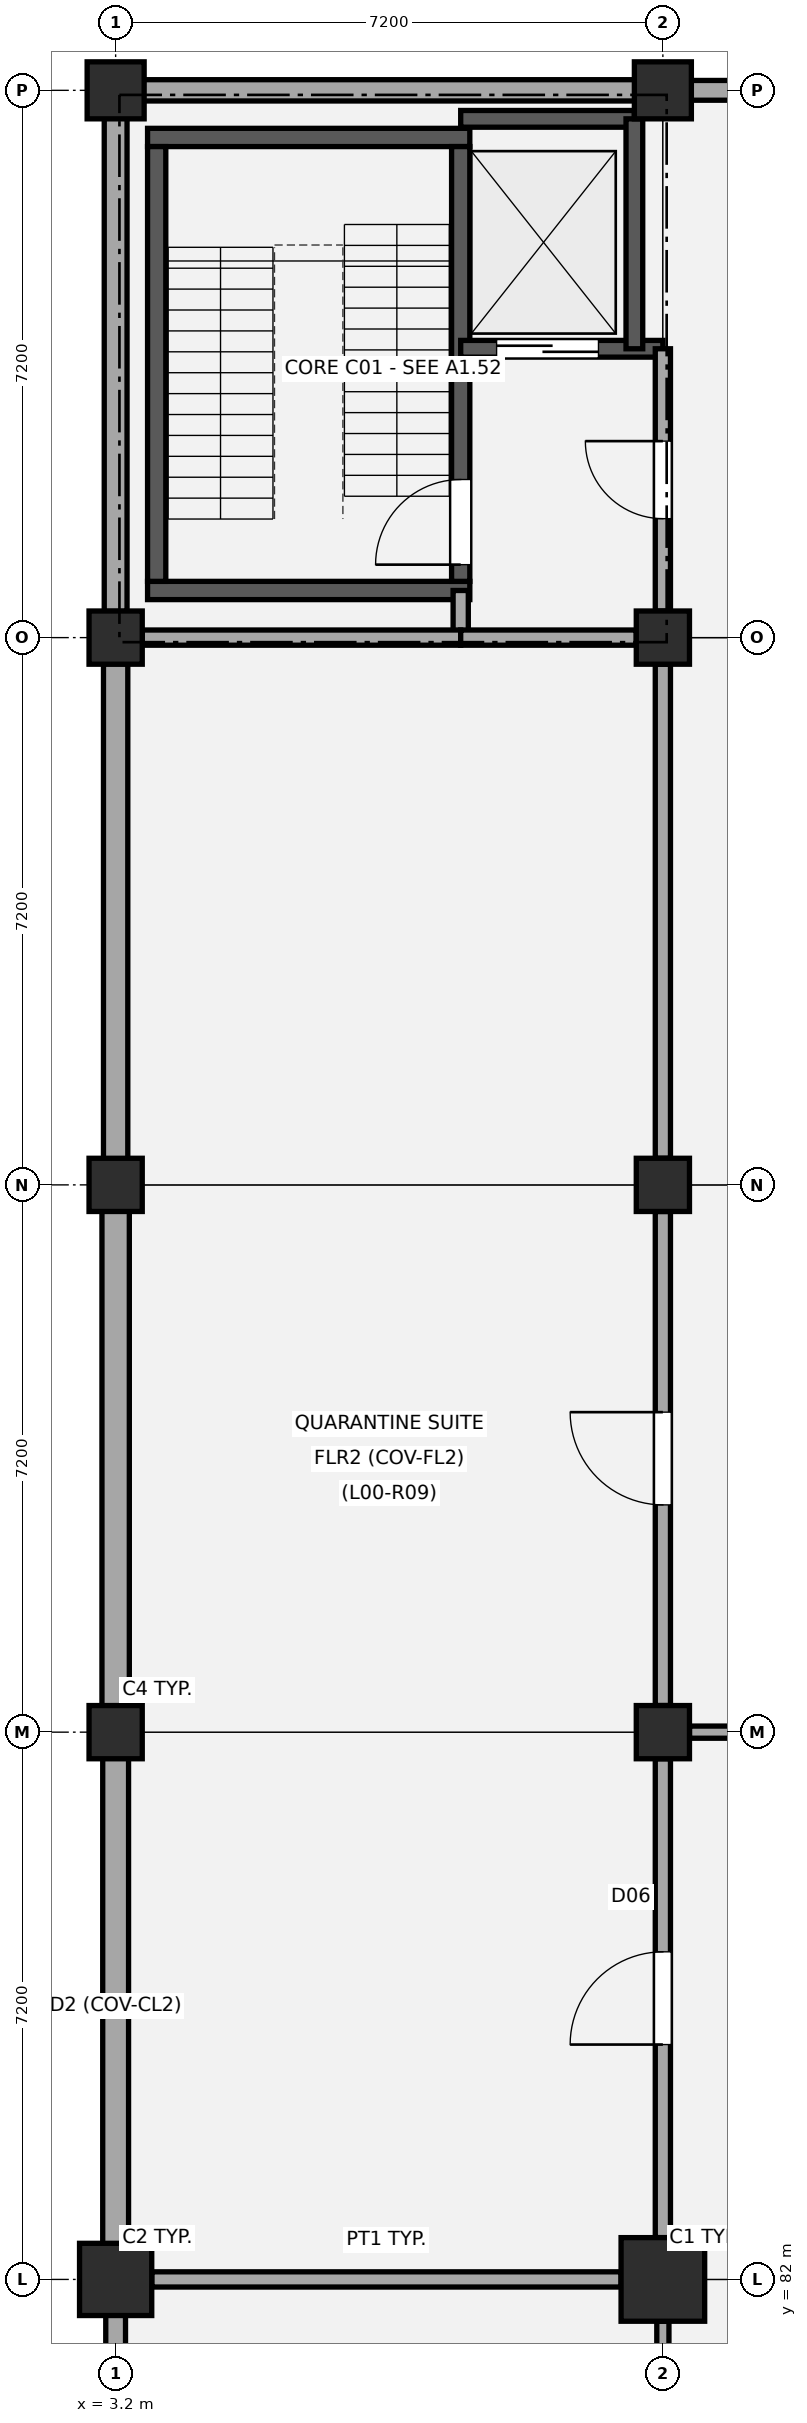
"""IFC4 building model, lengths in metres.
Left out: names, types, materials, properties, quantities, classifications, styles, units other than length and angle.
Written with IfcOpenShell. Run it as: python <this file> out.ifc"""

import sys

from ifc_helpers import new_model, si_unit, direction, frame, frame_2d, origin, origin_2d, place, context, subcontext, project, spatial, rectangle, circle, extrude, element, fill, save


model = new_model("IFC4")
c1 = context("Model", 3, precision=1e-05, world=origin(), true_north=direction((0.0, 1.0)))
c2 = subcontext(c1, "Body", "Model", "MODEL_VIEW")
j1 = project(units=[si_unit("LENGTHUNIT", "METRE"), si_unit("PLANEANGLEUNIT", "RADIAN")], contexts=[c1])
p1 = place(None, origin())
s1 = spatial("IfcSite", under=j1, at=p1, CompositionType="ELEMENT")
p2 = place(p1, origin())
s2 = spatial("IfcBuilding", under=s1, at=p2, CompositionType="ELEMENT")
p3 = place(p2, origin())
s3 = spatial("IfcBuildingStorey", under=s2, at=p3, CompositionType="ELEMENT", Elevation=0.0)
p4 = place(p3, frame((3.2, 82.0, -0.35), z_axis=(0.0, 0.0, 1.0), x_axis=(1.0, 0.0, 0.0)))
e1 = element("IfcColumn", 1, at=p4, inside=s3, PredefinedType="COLUMN", context=c2, shape_type="SweptSolid", body=[
    extrude(rectangle(XDim=0.95, YDim=0.95, at=origin_2d()), origin(), (0.0, 0.0, 1.0), 5.03),
])
for number, where, z_axis, x_axis in (
    (2, (3.2, 89.2, -0.35), (0.0, 0.0, 1.0), (1.0, 0.0, 0.0)),
    (3, (3.2, 96.4, -0.35), (0.0, 0.0, 1.0), (1.0, 0.0, 0.0)),
    (4, (3.2, 103.6, -0.35), (0.0, 0.0, 1.0), (1.0, 0.0, 0.0)),
):
    element("IfcColumn", number, at=place(p3, frame(where, z_axis=z_axis, x_axis=x_axis)), inside=s3, PredefinedType="COLUMN", context=c2, shape_type="SweptSolid", body=[
        extrude(rectangle(XDim=0.7, YDim=0.7, at=origin_2d()), origin(), (0.0, 0.0, 1.0), 5.03),
    ])
p5 = place(p3, frame((3.2, 110.8, -0.35), z_axis=(0.0, 0.0, 1.0), x_axis=(1.0, 0.0, 0.0)))
e5 = element("IfcColumn", 5, at=p5, inside=s3, PredefinedType="COLUMN", context=c2, shape_type="SweptSolid", body=[
    extrude(circle(Radius=0.375, at=origin_2d()), origin(), (0.0, 0.0, 1.0), 5.03),
])
p6 = place(p3, frame((10.4, 82.0, -0.35), z_axis=(0.0, 0.0, 1.0), x_axis=(1.0, 0.0, 0.0)))
e6 = element("IfcColumn", 6, at=p6, inside=s3, PredefinedType="COLUMN", context=c2, shape_type="SweptSolid", body=[
    extrude(rectangle(XDim=1.1, YDim=1.1, at=origin_2d()), origin(), (0.0, 0.0, 1.0), 5.03),
])
for number, where, z_axis, x_axis in (
    (7, (10.4, 89.2, -0.35), (0.0, 0.0, 1.0), (1.0, 0.0, 0.0)),
    (8, (10.4, 96.4, -0.35), (0.0, 0.0, 1.0), (1.0, 0.0, 0.0)),
    (9, (10.4, 103.6, -0.35), (0.0, 0.0, 1.0), (1.0, 0.0, 0.0)),
):
    element("IfcColumn", number, at=place(p3, frame(where, z_axis=z_axis, x_axis=x_axis)), inside=s3, PredefinedType="COLUMN", context=c2, shape_type="SweptSolid", body=[
        extrude(rectangle(XDim=0.7, YDim=0.7, at=origin_2d()), origin(), (0.0, 0.0, 1.0), 5.03),
    ])
p7 = place(p3, frame((10.4, 110.8, -0.35), z_axis=(0.0, 0.0, 1.0), x_axis=(1.0, 0.0, 0.0)))
e10 = element("IfcColumn", 10, at=p7, inside=s3, PredefinedType="COLUMN", context=c2, shape_type="SweptSolid", body=[
    extrude(circle(Radius=0.375, at=origin_2d()), origin(), (0.0, 0.0, 1.0), 5.03),
])
p8 = place(p3, frame((3.51, 110.8, 0.0), z_axis=(0.0, 0.0, 1.0), x_axis=(1.0, 0.0, 0.0)))
e11 = element("IfcWall", 11, at=p8, inside=s3, PredefinedType="STANDARD", context=c2, shape_type="SweptSolid", body=[
    extrude(rectangle(XDim=6.58, YDim=0.28, at=frame_2d((3.29, 0.0))), origin(), (0.0, 0.0, 1.0), 3.67),
])
p9 = place(p3, frame((10.71, 110.8, 0.0), z_axis=(0.0, 0.0, 1.0), x_axis=(1.0, 0.0, 0.0)))
e12 = element("IfcWall", 12, at=p9, inside=s3, PredefinedType="STANDARD", context=c2, shape_type="SweptSolid", body=[
    extrude(rectangle(XDim=6.58, YDim=0.26, at=frame_2d((3.29, 0.0))), origin(), (0.0, 0.0, 1.0), 3.67),
])
p10 = place(p3, frame((3.2, 75.345, 0.0), z_axis=(0.0, 0.0, 1.0), x_axis=(0.0, 1.0, 0.0)))
e13 = element("IfcWall", 13, at=p10, inside=s3, PredefinedType="STANDARD", context=c2, shape_type="SweptSolid", body=[
    extrude(rectangle(XDim=6.185, YDim=0.26, at=frame_2d((3.093, 0.0))), origin(), (0.0, 0.0, 1.0), 2.47),
])
p11 = place(p3, frame((3.2, 82.47, 0.0), z_axis=(0.0, 0.0, 1.0), x_axis=(0.0, 1.0, 0.0)))
e14 = element("IfcWall", 14, at=p11, inside=s3, PredefinedType="STANDARD", context=c2, shape_type="SweptSolid", body=[
    extrude(rectangle(XDim=6.385, YDim=0.34, at=frame_2d((3.192, 0.0))), origin(), (0.0, 0.0, 1.0), 3.67),
])
p12 = place(p3, frame((3.2, 89.545, 0.0), z_axis=(0.0, 0.0, 1.0), x_axis=(0.0, 1.0, 0.0)))
e15 = element("IfcWall", 15, at=p12, inside=s3, PredefinedType="STANDARD", context=c2, shape_type="SweptSolid", body=[
    extrude(rectangle(XDim=6.51, YDim=0.36, at=frame_2d((3.255, 0.0))), origin(), (0.0, 0.0, 1.0), 3.67),
])
p13 = place(p3, frame((3.2, 96.745, 0.0), z_axis=(0.0, 0.0, 1.0), x_axis=(0.0, 1.0, 0.0)))
e16 = element("IfcWall", 16, at=p13, inside=s3, PredefinedType="STANDARD", context=c2, shape_type="SweptSolid", body=[
    extrude(rectangle(XDim=6.51, YDim=0.32, at=frame_2d((3.255, 0.0))), origin(), (0.0, 0.0, 1.0), 3.67),
])
p14 = place(p3, frame((3.2, 103.945, 0.0), z_axis=(0.0, 0.0, 1.0), x_axis=(0.0, 1.0, 0.0)))
e17 = element("IfcWall", 17, at=p14, inside=s3, PredefinedType="STANDARD", context=c2, shape_type="SweptSolid", body=[
    extrude(rectangle(XDim=6.545, YDim=0.3, at=frame_2d((3.272, 0.0))), origin(), (0.0, 0.0, 1.0), 3.67),
])
for number, where, z_axis, x_axis in (
    (18, (3.62, 104.22, 0.0), (0.0, 0.0, 1.0), (1.0, 0.0, 0.0)),
    (19, (3.62, 110.18, 0.0), (0.0, 0.0, 1.0), (1.0, 0.0, 0.0)),
):
    element("IfcWall", number, at=place(p3, frame(where, z_axis=z_axis, x_axis=x_axis)), inside=s3, PredefinedType="SHEAR", context=c2, shape_type="SweptSolid", body=[
        extrude(rectangle(XDim=4.24, YDim=0.24, at=frame_2d((2.12, 0.0))), origin(), (0.0, 0.0, 1.0), 4.38),
    ])
p15 = place(p3, frame((3.74, 104.34, 0.0), z_axis=(0.0, 0.0, 1.0), x_axis=(0.0, 1.0, 0.0)))
e20 = element("IfcWall", 20, at=p15, inside=s3, PredefinedType="SHEAR", context=c2, shape_type="SweptSolid", body=[
    extrude(rectangle(XDim=5.72, YDim=0.24, at=frame_2d((2.86, 0.0))), origin(), (0.0, 0.0, 1.0), 4.38),
])
p16 = place(p3, frame((7.74, 104.34, 0.0), z_axis=(0.0, 0.0, 1.0), x_axis=(0.0, 1.0, 0.0)))
e21 = element("IfcWall", 21, at=p16, inside=s3, PredefinedType="SHEAR", context=c2, shape_type="SweptSolid", body=[
    extrude(rectangle(XDim=5.72, YDim=0.24, at=frame_2d((2.86, 0.0))), origin(), (0.0, 0.0, 1.0), 4.38),
])
p17 = place(p16, frame((0.22, 0.0, 0.0)))
e22 = element("IfcOpeningElement", 22, at=p17, cuts=e21, PredefinedType="OPENING", context=c2, shape_type="SweptSolid", body=[
    extrude(rectangle(XDim=1.12, YDim=2.15, at=frame_2d((0.56, 1.075))), frame((0.0, 0.13, 0.0), z_axis=(0.0, -1.0, 0.0), x_axis=(1.0, 0.0, 0.0)), (0.0, 0.0, 1.0), 0.26),
])
p18 = place(p3, frame((7.74, 107.4, 0.0), z_axis=(0.0, 0.0, 1.0), x_axis=(1.0, 0.0, 0.0)))
e23 = element("IfcWall", 23, at=p18, inside=s3, PredefinedType="SHEAR", context=c2, shape_type="SweptSolid", body=[
    extrude(rectangle(XDim=2.66, YDim=0.22, at=frame_2d((1.33, 0.0))), origin(), (0.0, 0.0, 1.0), 4.38),
])
p19 = place(p18, frame((0.472, 0.0, 0.0)))
e24 = element("IfcOpeningElement", 24, at=p19, cuts=e23, PredefinedType="OPENING", context=c2, shape_type="SweptSolid", body=[
    extrude(rectangle(XDim=1.34, YDim=2.15, at=frame_2d((0.67, 1.075))), frame((0.0, 0.12, 0.0), z_axis=(0.0, -1.0, 0.0), x_axis=(1.0, 0.0, 0.0)), (0.0, 0.0, 1.0), 0.24),
])
p20 = place(p3, frame((7.74, 110.425, 0.0), z_axis=(0.0, 0.0, 1.0), x_axis=(1.0, 0.0, 0.0)))
e25 = element("IfcWall", 25, at=p20, inside=s3, PredefinedType="SHEAR", context=c2, shape_type="SweptSolid", body=[
    extrude(rectangle(XDim=2.285, YDim=0.22, at=frame_2d((1.143, 0.0))), origin(), (0.0, 0.0, 1.0), 4.38),
])
p21 = place(p3, frame((10.025, 107.4, 0.0), z_axis=(0.0, 0.0, 1.0), x_axis=(0.0, 1.0, 0.0)))
e26 = element("IfcWall", 26, at=p21, inside=s3, PredefinedType="SHEAR", context=c2, shape_type="SweptSolid", body=[
    extrude(rectangle(XDim=3.025, YDim=0.22, at=frame_2d((1.513, 0.0))), origin(), (0.0, 0.0, 1.0), 4.38),
])
p22 = place(p3, frame((7.74, 103.6, 0.0), z_axis=(0.0, 0.0, 1.0), x_axis=(0.0, 1.0, 0.0)))
e27 = element("IfcWall", 27, at=p22, inside=s3, PredefinedType="PARTITIONING", context=c2, shape_type="SweptSolid", body=[
    extrude(rectangle(XDim=0.62, YDim=0.2, at=frame_2d((0.31, 0.0))), origin(), (0.0, 0.0, 1.0), 3.52),
])
p23 = place(p3, frame((10.4, 103.95, 0.0), z_axis=(0.0, 0.0, 1.0), x_axis=(0.0, 1.0, 0.0)))
e28 = element("IfcWall", 28, at=p23, inside=s3, PredefinedType="PARTITIONING", context=c2, shape_type="SweptSolid", body=[
    extrude(rectangle(XDim=3.45, YDim=0.2, at=frame_2d((1.725, 0.0))), origin(), (0.0, 0.0, 1.0), 3.62),
])
p24 = place(p23, frame((1.215, 0.0, 0.0)))
e29 = element("IfcOpeningElement", 29, at=p24, cuts=e28, PredefinedType="OPENING", context=c2, shape_type="SweptSolid", body=[
    extrude(rectangle(XDim=1.02, YDim=2.15, at=frame_2d((0.51, 1.075))), frame((0.0, 0.11, 0.0), z_axis=(0.0, -1.0, 0.0), x_axis=(1.0, 0.0, 0.0)), (0.0, 0.0, 1.0), 0.22),
])
p25 = place(p3, frame((3.55, 103.6, 0.0), z_axis=(0.0, 0.0, 1.0), x_axis=(1.0, 0.0, 0.0)))
e30 = element("IfcWall", 30, at=p25, inside=s3, PredefinedType="PARTITIONING", context=c2, shape_type="SweptSolid", body=[
    extrude(rectangle(XDim=4.19, YDim=0.2, at=frame_2d((2.095, 0.0))), origin(), (0.0, 0.0, 1.0), 3.52),
])
p26 = place(p3, frame((7.74, 103.6, 0.0), z_axis=(0.0, 0.0, 1.0), x_axis=(1.0, 0.0, 0.0)))
e31 = element("IfcWall", 31, at=p26, inside=s3, PredefinedType="PARTITIONING", context=c2, shape_type="SweptSolid", body=[
    extrude(rectangle(XDim=2.31, YDim=0.2, at=frame_2d((1.155, 0.0))), origin(), (0.0, 0.0, 1.0), 3.52),
])
p27 = place(p3, frame((10.4, 75.275, 0.0), z_axis=(0.0, 0.0, 1.0), x_axis=(0.0, 1.0, 0.0)))
e32 = element("IfcWall", 32, at=p27, inside=s3, PredefinedType="PARTITIONING", context=c2, shape_type="SweptSolid", body=[
    extrude(rectangle(XDim=6.175, YDim=0.16, at=frame_2d((3.087, 0.0))), origin(), (0.0, 0.0, 1.0), 2.47),
])
p28 = place(p27, frame((2.508, 0.0, 0.0)))
e33 = element("IfcOpeningElement", 33, at=p28, cuts=e32, PredefinedType="OPENING", context=c2, shape_type="SweptSolid", body=[
    extrude(rectangle(XDim=1.16, YDim=2.18, at=frame_2d((0.58, 1.09))), frame((0.0, 0.09, 0.0), z_axis=(0.0, -1.0, 0.0), x_axis=(1.0, 0.0, 0.0)), (0.0, 0.0, 1.0), 0.18),
])
p29 = place(p3, frame((3.675, 82.0, 0.0), z_axis=(0.0, 0.0, 1.0), x_axis=(1.0, 0.0, 0.0)))
e34 = element("IfcWall", 34, at=p29, inside=s3, PredefinedType="PARTITIONING", context=c2, shape_type="SweptSolid", body=[
    extrude(rectangle(XDim=6.175, YDim=0.2, at=frame_2d((3.087, 0.0))), origin(), (0.0, 0.0, 1.0), 2.37),
])
p30 = place(p3, frame((10.4, 82.55, 0.0), z_axis=(0.0, 0.0, 1.0), x_axis=(0.0, 1.0, 0.0)))
e35 = element("IfcWall", 35, at=p30, inside=s3, PredefinedType="PARTITIONING", context=c2, shape_type="SweptSolid", body=[
    extrude(rectangle(XDim=6.3, YDim=0.2, at=frame_2d((3.15, 0.0))), origin(), (0.0, 0.0, 1.0), 3.62),
])
p31 = place(p30, frame((2.54, 0.0, 0.0)))
e36 = element("IfcOpeningElement", 36, at=p31, cuts=e35, PredefinedType="OPENING", context=c2, shape_type="SweptSolid", body=[
    extrude(rectangle(XDim=1.22, YDim=2.16, at=frame_2d((0.61, 1.08))), frame((0.0, 0.11, 0.0), z_axis=(0.0, -1.0, 0.0), x_axis=(1.0, 0.0, 0.0)), (0.0, 0.0, 1.0), 0.22),
])
p32 = place(p3, frame((10.4, 89.55, 0.0), z_axis=(0.0, 0.0, 1.0), x_axis=(0.0, 1.0, 0.0)))
e37 = element("IfcWall", 37, at=p32, inside=s3, PredefinedType="PARTITIONING", context=c2, shape_type="SweptSolid", body=[
    extrude(rectangle(XDim=6.5, YDim=0.2, at=frame_2d((3.25, 0.0))), origin(), (0.0, 0.0, 1.0), 3.62),
])
p33 = place(p32, frame((2.64, 0.0, 0.0)))
e38 = element("IfcOpeningElement", 38, at=p33, cuts=e37, PredefinedType="OPENING", context=c2, shape_type="SweptSolid", body=[
    extrude(rectangle(XDim=1.22, YDim=2.16, at=frame_2d((0.61, 1.08))), frame((0.0, 0.11, 0.0), z_axis=(0.0, -1.0, 0.0), x_axis=(1.0, 0.0, 0.0)), (0.0, 0.0, 1.0), 0.22),
])
p34 = place(p3, frame((10.4, 96.75, 0.0), z_axis=(0.0, 0.0, 1.0), x_axis=(0.0, 1.0, 0.0)))
e39 = element("IfcWall", 39, at=p34, inside=s3, PredefinedType="PARTITIONING", context=c2, shape_type="SweptSolid", body=[
    extrude(rectangle(XDim=6.5, YDim=0.2, at=frame_2d((3.25, 0.0))), origin(), (0.0, 0.0, 1.0), 3.62),
])
p35 = place(p3, frame((10.75, 89.2, 0.0), z_axis=(0.0, 0.0, 1.0), x_axis=(1.0, 0.0, 0.0)))
e40 = element("IfcWall", 40, at=p35, inside=s3, PredefinedType="PARTITIONING", context=c2, shape_type="SweptSolid", body=[
    extrude(rectangle(XDim=6.5, YDim=0.16, at=frame_2d((3.25, 0.0))), origin(), (0.0, 0.0, 1.0), 3.62),
])
p36 = place(p35, frame((2.32, 0.0, 0.0)))
e41 = element("IfcOpeningElement", 41, at=p36, cuts=e40, PredefinedType="OPENING", context=c2, shape_type="SweptSolid", body=[
    extrude(rectangle(XDim=1.86, YDim=2.26, at=frame_2d((0.93, 1.13))), frame((0.0, 0.09, 0.0), z_axis=(0.0, -1.0, 0.0), x_axis=(1.0, 0.0, 0.0)), (0.0, 0.0, 1.0), 0.18),
])
p37 = place(p17, origin())
e42 = element("IfcDoor", 42, at=p37, inside=s3, OperationType="SINGLE_SWING_LEFT", PredefinedType="DOOR", context=c2, shape_type="SweptSolid", body=[
    extrude(rectangle(XDim=1.12, YDim=2.15, at=frame_2d((0.56, 1.075))), frame((0.0, 0.025, 0.0), z_axis=(0.0, -1.0, 0.0), x_axis=(1.0, 0.0, 0.0)), (0.0, 0.0, 1.0), 0.05),
])
fill(e22, e42)
p38 = place(p19, origin())
e43 = element("IfcDoor", 43, at=p38, inside=s3, OperationType="DOUBLE_DOOR_SLIDING", PredefinedType="DOOR", context=c2, shape_type="SweptSolid", body=[
    extrude(rectangle(XDim=1.34, YDim=2.15, at=frame_2d((0.67, 1.075))), frame((0.0, 0.025, 0.0), z_axis=(0.0, -1.0, 0.0), x_axis=(1.0, 0.0, 0.0)), (0.0, 0.0, 1.0), 0.05),
])
fill(e24, e43)
p39 = place(p24, origin())
e44 = element("IfcDoor", 44, at=p39, inside=s3, OperationType="SINGLE_SWING_RIGHT", PredefinedType="DOOR", context=c2, shape_type="SweptSolid", body=[
    extrude(rectangle(XDim=1.02, YDim=2.15, at=frame_2d((0.51, 1.075))), frame((0.0, 0.025, 0.0), z_axis=(0.0, -1.0, 0.0), x_axis=(1.0, 0.0, 0.0)), (0.0, 0.0, 1.0), 0.05),
])
fill(e29, e44)
p40 = place(p31, origin())
e45 = element("IfcDoor", 45, at=p40, inside=s3, OperationType="SINGLE_SWING_LEFT", PredefinedType="DOOR", context=c2, shape_type="SweptSolid", body=[
    extrude(rectangle(XDim=1.22, YDim=2.16, at=frame_2d((0.61, 1.08))), frame((0.0, 0.025, 0.0), z_axis=(0.0, -1.0, 0.0), x_axis=(1.0, 0.0, 0.0)), (0.0, 0.0, 1.0), 0.05),
])
fill(e36, e45)
p41 = place(p33, origin())
e46 = element("IfcDoor", 46, at=p41, inside=s3, OperationType="SINGLE_SWING_RIGHT", PredefinedType="DOOR", context=c2, shape_type="SweptSolid", body=[
    extrude(rectangle(XDim=1.22, YDim=2.16, at=frame_2d((0.61, 1.08))), frame((0.0, 0.025, 0.0), z_axis=(0.0, -1.0, 0.0), x_axis=(1.0, 0.0, 0.0)), (0.0, 0.0, 1.0), 0.05),
])
fill(e38, e46)
save(model, sys.argv[1])
